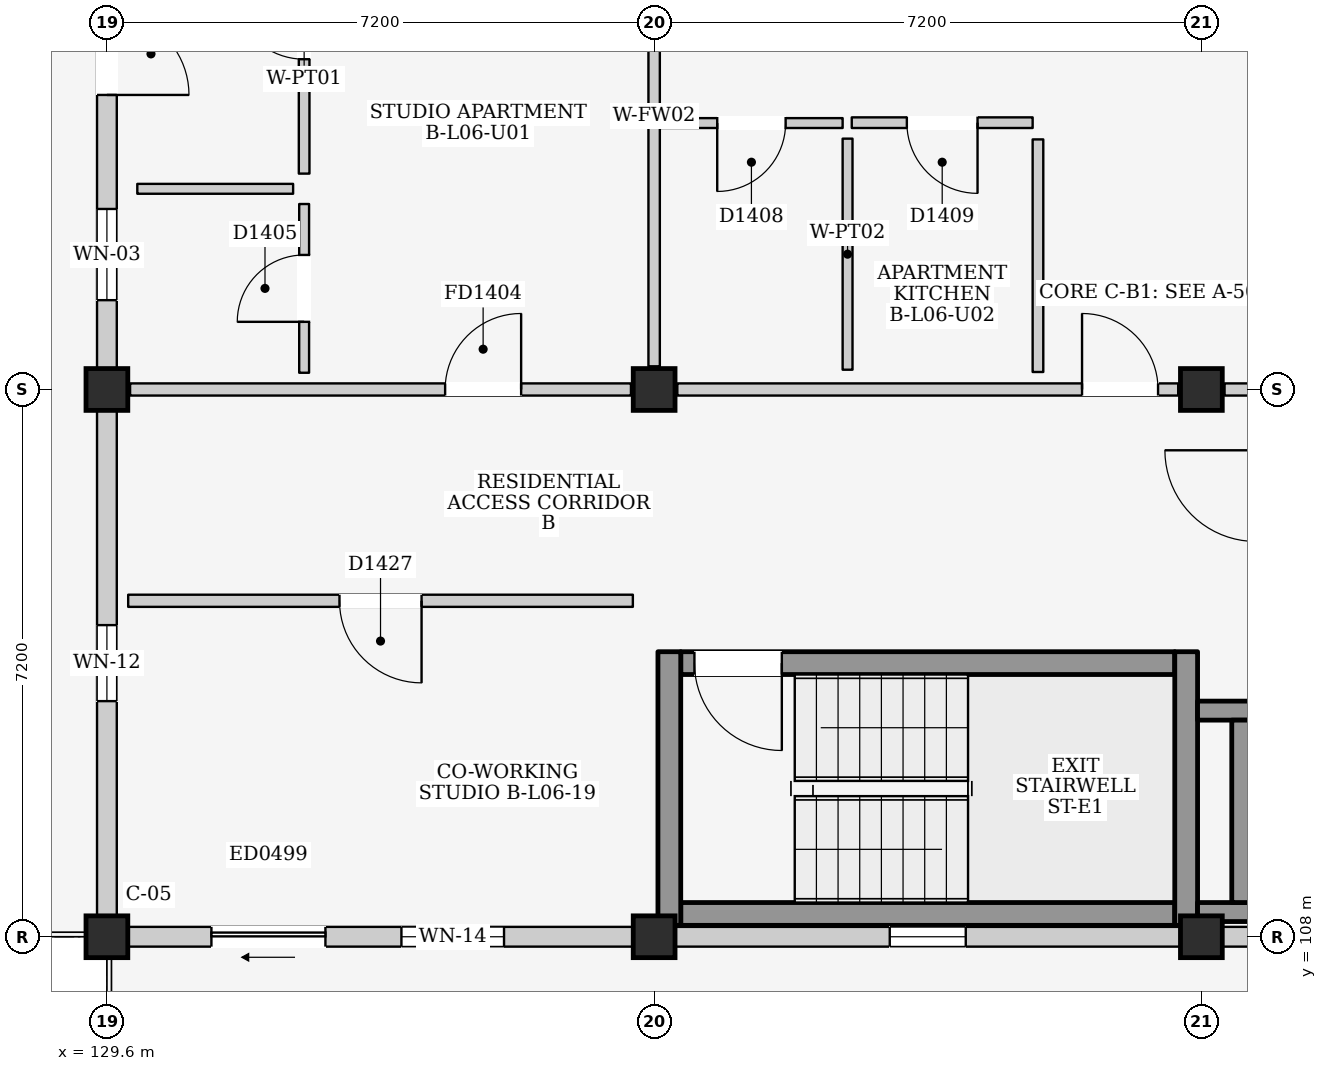
"""IFC4 building model, lengths in metres.
Left out: names, types, materials, properties, quantities, classifications, styles, units other than length and angle.
Written with IfcOpenShell. Run it as: python <this file> out.ifc"""

import sys

from ifc_helpers import new_model, si_unit, direction, frame, frame_2d, origin, origin_2d, place, context, subcontext, project, spatial, rectangle, extrude, element, fill, save


model = new_model("IFC4")
c1 = context("Model", 3, precision=1e-05, world=origin(), true_north=direction((0.0, 1.0)))
c2 = subcontext(c1, "Body", "Model", "MODEL_VIEW")
j1 = project(units=[si_unit("LENGTHUNIT", "METRE"), si_unit("PLANEANGLEUNIT", "RADIAN")], contexts=[c1])
p1 = place(None, origin())
s1 = spatial("IfcSite", under=j1, at=p1, CompositionType="ELEMENT")
p2 = place(p1, origin())
s2 = spatial("IfcBuilding", under=s1, at=p2, CompositionType="ELEMENT")
p3 = place(p2, frame((0.0, 0.0, 21.9)))
s3 = spatial("IfcBuildingStorey", under=s2, at=p3, CompositionType="ELEMENT", Elevation=21.9)
for number, where, z_axis, x_axis in (
    (1, (129.6, 108.0, 0.0), (0.0, 0.0, 1.0), (1.0, 0.0, 0.0)),
    (2, (129.6, 115.2, 0.0), (0.0, 0.0, 1.0), (1.0, 0.0, 0.0)),
    (3, (136.8, 108.0, 0.0), (0.0, 0.0, 1.0), (1.0, 0.0, 0.0)),
    (4, (136.8, 115.2, 0.0), (0.0, 0.0, 1.0), (1.0, 0.0, 0.0)),
    (5, (144.0, 108.0, 0.0), (0.0, 0.0, 1.0), (1.0, 0.0, 0.0)),
    (6, (144.0, 115.2, 0.0), (0.0, 0.0, 1.0), (1.0, 0.0, 0.0)),
):
    element("IfcColumn", number, at=place(p3, frame(where, z_axis=z_axis, x_axis=x_axis)), inside=s3, PredefinedType="COLUMN", context=c2, shape_type="SweptSolid", body=[
        extrude(rectangle(XDim=0.55, YDim=0.55, at=origin_2d()), origin(), (0.0, 0.0, 1.0), 3.2),
    ])
p4 = place(p3, frame((129.875, 108.0, 0.0), z_axis=(0.0, 0.0, 1.0), x_axis=(1.0, 0.0, 0.0)))
e7 = element("IfcWall", 7, at=p4, inside=s3, PredefinedType="ELEMENTEDWALL", context=c2, shape_type="SweptSolid", body=[
    extrude(rectangle(XDim=6.65, YDim=0.26, at=frame_2d((3.325, 0.0))), origin(), (0.0, 0.0, 1.0), 2.365),
])
p5 = place(p4, frame((1.1, 0.0, 0.0)))
e8 = element("IfcOpeningElement", 8, at=p5, cuts=e7, PredefinedType="OPENING", context=c2, shape_type="SweptSolid", body=[
    extrude(rectangle(XDim=1.5, YDim=2.12, at=frame_2d((0.75, 1.06))), frame((0.0, 0.145, 0.0), z_axis=(0.0, -1.0, 0.0), x_axis=(1.0, 0.0, 0.0)), (0.0, 0.0, 1.0), 0.29),
])
p6 = place(p4, frame((3.6, 0.0, 0.755)))
e9 = element("IfcOpeningElement", 9, at=p6, cuts=e7, PredefinedType="OPENING", context=c2, shape_type="SweptSolid", body=[
    extrude(rectangle(XDim=1.35, YDim=1.5, at=frame_2d((0.675, 0.75))), frame((0.0, 0.145, 0.0), z_axis=(0.0, -1.0, 0.0), x_axis=(1.0, 0.0, 0.0)), (0.0, 0.0, 1.0), 0.29),
])
p7 = place(p3, frame((129.6, 108.275, 0.0), z_axis=(0.0, 0.0, 1.0), x_axis=(0.0, 1.0, 0.0)))
e10 = element("IfcWall", 10, at=p7, inside=s3, PredefinedType="ELEMENTEDWALL", context=c2, shape_type="SweptSolid", body=[
    extrude(rectangle(XDim=6.65, YDim=0.26, at=frame_2d((3.325, 0.0))), origin(), (0.0, 0.0, 1.0), 2.465),
])
p8 = place(p7, frame((2.825, 0.0, 1.1)))
e11 = element("IfcOpeningElement", 11, at=p8, cuts=e10, PredefinedType="OPENING", context=c2, shape_type="SweptSolid", body=[
    extrude(rectangle(XDim=1.0, YDim=0.9, at=frame_2d((0.5, 0.45))), frame((0.0, 0.145, 0.0), z_axis=(0.0, -1.0, 0.0), x_axis=(1.0, 0.0, 0.0)), (0.0, 0.0, 1.0), 0.29),
])
p9 = place(p3, frame((129.6, 115.475, 0.0), z_axis=(0.0, 0.0, 1.0), x_axis=(0.0, 1.0, 0.0)))
e12 = element("IfcWall", 12, at=p9, inside=s3, PredefinedType="ELEMENTEDWALL", context=c2, shape_type="SweptSolid", body=[
    extrude(rectangle(XDim=6.65, YDim=0.26, at=frame_2d((3.325, 0.0))), origin(), (0.0, 0.0, 1.0), 2.465),
])
p10 = place(p9, frame((3.6, 0.0, 0.0)))
e13 = element("IfcOpeningElement", 13, at=p10, cuts=e12, PredefinedType="OPENING", context=c2, shape_type="SweptSolid", body=[
    extrude(rectangle(XDim=1.08, YDim=2.12, at=frame_2d((0.54, 1.06))), frame((0.0, 0.145, 0.0), z_axis=(0.0, -1.0, 0.0), x_axis=(1.0, 0.0, 0.0)), (0.0, 0.0, 1.0), 0.29),
])
p11 = place(p9, frame((0.9, 0.0, 0.95)))
e14 = element("IfcOpeningElement", 14, at=p11, cuts=e12, PredefinedType="OPENING", context=c2, shape_type="SweptSolid", body=[
    extrude(rectangle(XDim=1.2, YDim=1.35, at=frame_2d((0.6, 0.675))), frame((0.0, 0.145, 0.0), z_axis=(0.0, -1.0, 0.0), x_axis=(1.0, 0.0, 0.0)), (0.0, 0.0, 1.0), 0.29),
])
p12 = place(p3, frame((137.075, 108.0, 0.0), z_axis=(0.0, 0.0, 1.0), x_axis=(1.0, 0.0, 0.0)))
e15 = element("IfcWall", 15, at=p12, inside=s3, PredefinedType="ELEMENTEDWALL", context=c2, shape_type="SweptSolid", body=[
    extrude(rectangle(XDim=6.65, YDim=0.26, at=frame_2d((3.325, 0.0))), origin(), (0.0, 0.0, 1.0), 2.365),
])
p13 = place(p12, frame((2.825, 0.0, 1.2)))
e16 = element("IfcOpeningElement", 16, at=p13, cuts=e15, PredefinedType="OPENING", context=c2, shape_type="SweptSolid", body=[
    extrude(rectangle(XDim=1.0, YDim=0.9, at=frame_2d((0.5, 0.45))), frame((0.0, 0.145, 0.0), z_axis=(0.0, -1.0, 0.0), x_axis=(1.0, 0.0, 0.0)), (0.0, 0.0, 1.0), 0.29),
])
p14 = place(p3, frame((144.275, 108.0, 0.0), z_axis=(0.0, 0.0, 1.0), x_axis=(1.0, 0.0, 0.0)))
e17 = element("IfcWall", 17, at=p14, inside=s3, PredefinedType="ELEMENTEDWALL", context=c2, shape_type="SweptSolid", body=[
    extrude(rectangle(XDim=6.65, YDim=0.26, at=frame_2d((3.325, 0.0))), origin(), (0.0, 0.0, 1.0), 2.365),
])
p15 = place(p14, frame((2.825, 0.0, 1.2)))
e18 = element("IfcOpeningElement", 18, at=p15, cuts=e17, PredefinedType="OPENING", context=c2, shape_type="SweptSolid", body=[
    extrude(rectangle(XDim=1.0, YDim=0.9, at=frame_2d((0.5, 0.45))), frame((0.0, 0.145, 0.0), z_axis=(0.0, -1.0, 0.0), x_axis=(1.0, 0.0, 0.0)), (0.0, 0.0, 1.0), 0.29),
])
p16 = place(p3, frame((137.15, 108.3, 0.0), z_axis=(0.0, 0.0, 1.0), x_axis=(1.0, 0.0, 0.0)))
e19 = element("IfcWall", 19, at=p16, inside=s3, PredefinedType="SHEAR", context=c2, shape_type="SweptSolid", body=[
    extrude(rectangle(XDim=6.5, YDim=0.3, at=frame_2d((3.25, 0.0))), origin(), (0.0, 0.0, 1.0), 2.98),
])
p17 = place(p3, frame((137.15, 111.6, 0.0), z_axis=(0.0, 0.0, 1.0), x_axis=(1.0, 0.0, 0.0)))
e20 = element("IfcWall", 20, at=p17, inside=s3, PredefinedType="SHEAR", context=c2, shape_type="SweptSolid", body=[
    extrude(rectangle(XDim=6.5, YDim=0.3, at=frame_2d((3.25, 0.0))), origin(), (0.0, 0.0, 1.0), 2.98),
])
p18 = place(p17, frame((0.18, 0.0, 0.0)))
e21 = element("IfcOpeningElement", 21, at=p18, cuts=e20, PredefinedType="OPENING", context=c2, shape_type="SweptSolid", body=[
    extrude(rectangle(XDim=1.15, YDim=2.2, at=frame_2d((0.575, 1.1))), frame((0.0, 0.165, 0.0), z_axis=(0.0, -1.0, 0.0), x_axis=(1.0, 0.0, 0.0)), (0.0, 0.0, 1.0), 0.33),
])
for number, where, z_axis, x_axis in (
    (22, (137.0, 108.15, 0.0), (0.0, 0.0, 1.0), (0.0, 1.0, 0.0)),
    (23, (143.8, 108.15, 0.0), (0.0, 0.0, 1.0), (0.0, 1.0, 0.0)),
):
    element("IfcWall", number, at=place(p3, frame(where, z_axis=z_axis, x_axis=x_axis)), inside=s3, PredefinedType="SHEAR", context=c2, shape_type="SweptSolid", body=[
        extrude(rectangle(XDim=3.6, YDim=0.3, at=frame_2d((1.8, 0.0))), origin(), (0.0, 0.0, 1.0), 2.98),
    ])
p19 = place(p3, frame((143.95, 108.325, 0.0), z_axis=(0.0, 0.0, 1.0), x_axis=(1.0, 0.0, 0.0)))
e24 = element("IfcWall", 24, at=p19, inside=s3, PredefinedType="SHEAR", context=c2, shape_type="SweptSolid", body=[
    extrude(rectangle(XDim=2.675, YDim=0.25, at=frame_2d((1.337, 0.0))), origin(), (0.0, 0.0, 1.0), 2.98),
])
p20 = place(p3, frame((143.95, 110.975, 0.0), z_axis=(0.0, 0.0, 1.0), x_axis=(1.0, 0.0, 0.0)))
e25 = element("IfcWall", 25, at=p20, inside=s3, PredefinedType="SHEAR", context=c2, shape_type="SweptSolid", body=[
    extrude(rectangle(XDim=2.675, YDim=0.25, at=frame_2d((1.337, 0.0))), origin(), (0.0, 0.0, 1.0), 2.98),
])
p21 = place(p20, frame((1.0, 0.0, 0.0)))
e26 = element("IfcOpeningElement", 26, at=p21, cuts=e25, PredefinedType="OPENING", context=c2, shape_type="SweptSolid", body=[
    extrude(rectangle(XDim=1.2, YDim=2.25, at=frame_2d((0.6, 1.125))), frame((0.0, 0.14, 0.0), z_axis=(0.0, -1.0, 0.0), x_axis=(1.0, 0.0, 0.0)), (0.0, 0.0, 1.0), 0.28),
])
p22 = place(p3, frame((144.525, 108.45, 0.0), z_axis=(0.0, 0.0, 1.0), x_axis=(0.0, 1.0, 0.0)))
e27 = element("IfcWall", 27, at=p22, inside=s3, PredefinedType="SHEAR", context=c2, shape_type="SweptSolid", body=[
    extrude(rectangle(XDim=2.4, YDim=0.25, at=frame_2d((1.2, 0.0))), origin(), (0.0, 0.0, 1.0), 2.98),
])
p23 = place(p3, frame((129.905, 115.2, 0.0), z_axis=(0.0, 0.0, 1.0), x_axis=(1.0, 0.0, 0.0)))
e28 = element("IfcWall", 28, at=p23, inside=s3, PredefinedType="PARTITIONING", context=c2, shape_type="SweptSolid", body=[
    extrude(rectangle(XDim=6.59, YDim=0.16, at=frame_2d((3.295, 0.0))), origin(), (0.0, 0.0, 1.0), 2.365),
])
p24 = place(p23, frame((4.145, 0.0, 0.0)))
e29 = element("IfcOpeningElement", 29, at=p24, cuts=e28, PredefinedType="OPENING", context=c2, shape_type="SweptSolid", body=[
    extrude(rectangle(XDim=1.0, YDim=2.15, at=frame_2d((0.5, 1.075))), frame((0.0, 0.095, 0.0), z_axis=(0.0, -1.0, 0.0), x_axis=(1.0, 0.0, 0.0)), (0.0, 0.0, 1.0), 0.19),
])
p25 = place(p3, frame((136.8, 115.505, 0.0), z_axis=(0.0, 0.0, 1.0), x_axis=(0.0, 1.0, 0.0)))
e30 = element("IfcWall", 30, at=p25, inside=s3, PredefinedType="PARTITIONING", context=c2, shape_type="SweptSolid", body=[
    extrude(rectangle(XDim=6.59, YDim=0.15, at=frame_2d((3.295, 0.0))), origin(), (0.0, 0.0, 1.0), 2.465),
])
p26 = place(p3, frame((130.0, 117.84, 0.0), z_axis=(0.0, 0.0, 1.0), x_axis=(1.0, 0.0, 0.0)))
e31 = element("IfcWall", 31, at=p26, inside=s3, PredefinedType="PARTITIONING", context=c2, shape_type="SweptSolid", body=[
    extrude(rectangle(XDim=2.05, YDim=0.13, at=frame_2d((1.025, 0.0))), origin(), (0.0, 0.0, 1.0), 2.98),
])
p27 = place(p3, frame((132.195, 115.42, 0.0), z_axis=(0.0, 0.0, 1.0), x_axis=(0.0, 1.0, 0.0)))
e32 = element("IfcWall", 32, at=p27, inside=s3, PredefinedType="PARTITIONING", context=c2, shape_type="SweptSolid", body=[
    extrude(rectangle(XDim=2.22, YDim=0.13, at=frame_2d((1.11, 0.0))), origin(), (0.0, 0.0, 1.0), 2.98),
])
p28 = place(p27, frame((0.67, 0.0, 0.0)))
e33 = element("IfcOpeningElement", 33, at=p28, cuts=e32, PredefinedType="OPENING", context=c2, shape_type="SweptSolid", body=[
    extrude(rectangle(XDim=0.88, YDim=2.1, at=frame_2d((0.44, 1.05))), frame((0.0, 0.08, 0.0), z_axis=(0.0, -1.0, 0.0), x_axis=(1.0, 0.0, 0.0)), (0.0, 0.0, 1.0), 0.16),
])
p29 = place(p3, frame((132.195, 118.04, 0.0), z_axis=(0.0, 0.0, 1.0), x_axis=(0.0, 1.0, 0.0)))
e34 = element("IfcWall", 34, at=p29, inside=s3, PredefinedType="PARTITIONING", context=c2, shape_type="SweptSolid", body=[
    extrude(rectangle(XDim=3.94, YDim=0.14, at=frame_2d((1.97, 0.0))), origin(), (0.0, 0.0, 1.0), 2.98),
])
p30 = place(p29, frame((1.505, 0.0, 0.0)))
e35 = element("IfcOpeningElement", 35, at=p30, cuts=e34, PredefinedType="OPENING", context=c2, shape_type="SweptSolid", body=[
    extrude(rectangle(XDim=0.93, YDim=2.14, at=frame_2d((0.465, 1.07))), frame((0.0, 0.085, 0.0), z_axis=(0.0, -1.0, 0.0), x_axis=(1.0, 0.0, 0.0)), (0.0, 0.0, 1.0), 0.17),
])
p31 = place(p3, frame((137.105, 115.2, 0.0), z_axis=(0.0, 0.0, 1.0), x_axis=(1.0, 0.0, 0.0)))
e36 = element("IfcWall", 36, at=p31, inside=s3, PredefinedType="PARTITIONING", context=c2, shape_type="SweptSolid", body=[
    extrude(rectangle(XDim=6.59, YDim=0.16, at=frame_2d((3.295, 0.0))), origin(), (0.0, 0.0, 1.0), 2.365),
])
p32 = place(p31, frame((5.325, 0.0, 0.0)))
e37 = element("IfcOpeningElement", 37, at=p32, cuts=e36, PredefinedType="OPENING", context=c2, shape_type="SweptSolid", body=[
    extrude(rectangle(XDim=1.0, YDim=2.15, at=frame_2d((0.5, 1.075))), frame((0.0, 0.095, 0.0), z_axis=(0.0, -1.0, 0.0), x_axis=(1.0, 0.0, 0.0)), (0.0, 0.0, 1.0), 0.19),
])
p33 = place(p3, frame((144.305, 115.2, 0.0), z_axis=(0.0, 0.0, 1.0), x_axis=(1.0, 0.0, 0.0)))
e38 = element("IfcWall", 38, at=p33, inside=s3, PredefinedType="PARTITIONING", context=c2, shape_type="SweptSolid", body=[
    extrude(rectangle(XDim=6.59, YDim=0.16, at=frame_2d((3.295, 0.0))), origin(), (0.0, 0.0, 1.0), 2.365),
])
p34 = place(p3, frame((136.88, 118.705, 0.0), z_axis=(0.0, 0.0, 1.0), x_axis=(1.0, 0.0, 0.0)))
e39 = element("IfcWall", 39, at=p34, inside=s3, PredefinedType="PARTITIONING", context=c2, shape_type="SweptSolid", body=[
    extrude(rectangle(XDim=2.4, YDim=0.13, at=frame_2d((1.2, 0.0))), origin(), (0.0, 0.0, 1.0), 2.98),
])
p35 = place(p34, frame((0.75, 0.0, 0.0)))
e40 = element("IfcOpeningElement", 40, at=p35, cuts=e39, PredefinedType="OPENING", context=c2, shape_type="SweptSolid", body=[
    extrude(rectangle(XDim=0.9, YDim=2.1, at=frame_2d((0.45, 1.05))), frame((0.0, 0.08, 0.0), z_axis=(0.0, -1.0, 0.0), x_axis=(1.0, 0.0, 0.0)), (0.0, 0.0, 1.0), 0.16),
])
p36 = place(p3, frame((139.345, 115.46, 0.0), z_axis=(0.0, 0.0, 1.0), x_axis=(0.0, 1.0, 0.0)))
e41 = element("IfcWall", 41, at=p36, inside=s3, PredefinedType="PARTITIONING", context=c2, shape_type="SweptSolid", body=[
    extrude(rectangle(XDim=3.04, YDim=0.13, at=frame_2d((1.52, 0.0))), origin(), (0.0, 0.0, 1.0), 2.98),
])
p37 = place(p3, frame((139.4, 118.71, 0.0), z_axis=(0.0, 0.0, 1.0), x_axis=(1.0, 0.0, 0.0)))
e42 = element("IfcWall", 42, at=p37, inside=s3, PredefinedType="PARTITIONING", context=c2, shape_type="SweptSolid", body=[
    extrude(rectangle(XDim=2.38, YDim=0.14, at=frame_2d((1.19, 0.0))), origin(), (0.0, 0.0, 1.0), 2.98),
])
p38 = place(p37, frame((0.725, 0.0, 0.0)))
e43 = element("IfcOpeningElement", 43, at=p38, cuts=e42, PredefinedType="OPENING", context=c2, shape_type="SweptSolid", body=[
    extrude(rectangle(XDim=0.93, YDim=2.14, at=frame_2d((0.465, 1.07))), frame((0.0, 0.085, 0.0), z_axis=(0.0, -1.0, 0.0), x_axis=(1.0, 0.0, 0.0)), (0.0, 0.0, 1.0), 0.17),
])
p39 = place(p3, frame((141.85, 115.43, 0.0), z_axis=(0.0, 0.0, 1.0), x_axis=(0.0, 1.0, 0.0)))
e44 = element("IfcWall", 44, at=p39, inside=s3, PredefinedType="PARTITIONING", context=c2, shape_type="SweptSolid", body=[
    extrude(rectangle(XDim=3.06, YDim=0.14, at=frame_2d((1.53, 0.0))), origin(), (0.0, 0.0, 1.0), 2.98),
])
p40 = place(p3, frame((129.88, 112.42, 0.0), z_axis=(0.0, 0.0, 1.0), x_axis=(1.0, 0.0, 0.0)))
e45 = element("IfcWall", 45, at=p40, inside=s3, PredefinedType="PARTITIONING", context=c2, shape_type="SweptSolid", body=[
    extrude(rectangle(XDim=6.64, YDim=0.16, at=frame_2d((3.32, 0.0))), origin(), (0.0, 0.0, 1.0), 2.98),
])
p41 = place(p40, frame((2.78, 0.0, 0.0)))
e46 = element("IfcOpeningElement", 46, at=p41, cuts=e45, PredefinedType="OPENING", context=c2, shape_type="SweptSolid", body=[
    extrude(rectangle(XDim=1.08, YDim=2.22, at=frame_2d((0.54, 1.11))), frame((0.0, 0.095, 0.0), z_axis=(0.0, -1.0, 0.0), x_axis=(1.0, 0.0, 0.0)), (0.0, 0.0, 1.0), 0.19),
])
p42 = place(p5, frame((1.5, 0.0, 0.0), z_axis=(0.0, 0.0, 1.0), x_axis=(-1.0, 0.0, 0.0)))
e47 = element("IfcDoor", 47, at=p42, inside=s3, OperationType="SLIDING_TO_LEFT", PredefinedType="DOOR", context=c2, shape_type="SweptSolid", body=[
    extrude(rectangle(XDim=1.5, YDim=2.12, at=frame_2d((0.75, 1.06))), frame((0.0, 0.025, 0.0), z_axis=(0.0, -1.0, 0.0), x_axis=(1.0, 0.0, 0.0)), (0.0, 0.0, 1.0), 0.05),
])
fill(e8, e47)
p43 = place(p6, origin())
e48 = element("IfcWindow", 48, at=p43, inside=s3, PartitioningType="SINGLE_PANEL", PredefinedType="WINDOW", context=c2, shape_type="SweptSolid", body=[
    extrude(rectangle(XDim=1.35, YDim=1.5, at=frame_2d((0.675, 0.75))), frame((0.0, 0.03, 0.0), z_axis=(0.0, -1.0, 0.0), x_axis=(1.0, 0.0, 0.0)), (0.0, 0.0, 1.0), 0.06),
])
fill(e9, e48)
p44 = place(p8, origin())
e49 = element("IfcWindow", 49, at=p44, inside=s3, PartitioningType="SINGLE_PANEL", PredefinedType="WINDOW", context=c2, shape_type="SweptSolid", body=[
    extrude(rectangle(XDim=1.0, YDim=0.9, at=frame_2d((0.5, 0.45))), frame((0.0, 0.03, 0.0), z_axis=(0.0, -1.0, 0.0), x_axis=(1.0, 0.0, 0.0)), (0.0, 0.0, 1.0), 0.06),
])
fill(e11, e49)
p45 = place(p10, frame((1.08, 0.0, 0.0), z_axis=(0.0, 0.0, 1.0), x_axis=(-1.0, 0.0, 0.0)))
e50 = element("IfcDoor", 50, at=p45, inside=s3, OperationType="SINGLE_SWING_RIGHT", PredefinedType="DOOR", context=c2, shape_type="SweptSolid", body=[
    extrude(rectangle(XDim=1.08, YDim=2.12, at=frame_2d((0.54, 1.06))), frame((0.0, 0.025, 0.0), z_axis=(0.0, -1.0, 0.0), x_axis=(1.0, 0.0, 0.0)), (0.0, 0.0, 1.0), 0.05),
])
fill(e13, e50)
p46 = place(p11, origin())
e51 = element("IfcWindow", 51, at=p46, inside=s3, PartitioningType="SINGLE_PANEL", PredefinedType="WINDOW", context=c2, shape_type="SweptSolid", body=[
    extrude(rectangle(XDim=1.2, YDim=1.35, at=frame_2d((0.6, 0.675))), frame((0.0, 0.03, 0.0), z_axis=(0.0, -1.0, 0.0), x_axis=(1.0, 0.0, 0.0)), (0.0, 0.0, 1.0), 0.06),
])
fill(e14, e51)
p47 = place(p13, origin())
e52 = element("IfcWindow", 52, at=p47, inside=s3, PartitioningType="SINGLE_PANEL", PredefinedType="WINDOW", context=c2, shape_type="SweptSolid", body=[
    extrude(rectangle(XDim=1.0, YDim=0.9, at=frame_2d((0.5, 0.45))), frame((0.0, 0.03, 0.0), z_axis=(0.0, -1.0, 0.0), x_axis=(1.0, 0.0, 0.0)), (0.0, 0.0, 1.0), 0.06),
])
fill(e16, e52)
p48 = place(p18, frame((1.15, 0.0, 0.0), z_axis=(0.0, 0.0, 1.0), x_axis=(-1.0, 0.0, 0.0)))
e53 = element("IfcDoor", 53, at=p48, inside=s3, OperationType="SINGLE_SWING_LEFT", PredefinedType="DOOR", context=c2, shape_type="SweptSolid", body=[
    extrude(rectangle(XDim=1.15, YDim=2.2, at=frame_2d((0.575, 1.1))), frame((0.0, 0.025, 0.0), z_axis=(0.0, -1.0, 0.0), x_axis=(1.0, 0.0, 0.0)), (0.0, 0.0, 1.0), 0.05),
])
fill(e21, e53)
p49 = place(p24, origin())
e54 = element("IfcDoor", 54, at=p49, inside=s3, OperationType="SINGLE_SWING_RIGHT", PredefinedType="DOOR", context=c2, shape_type="SweptSolid", body=[
    extrude(rectangle(XDim=1.0, YDim=2.15, at=frame_2d((0.5, 1.075))), frame((0.0, 0.025, 0.0), z_axis=(0.0, -1.0, 0.0), x_axis=(1.0, 0.0, 0.0)), (0.0, 0.0, 1.0), 0.05),
])
fill(e29, e54)
p50 = place(p28, origin())
e55 = element("IfcDoor", 55, at=p50, inside=s3, OperationType="SINGLE_SWING_LEFT", PredefinedType="DOOR", context=c2, shape_type="SweptSolid", body=[
    extrude(rectangle(XDim=0.88, YDim=2.1, at=frame_2d((0.44, 1.05))), frame((0.0, 0.025, 0.0), z_axis=(0.0, -1.0, 0.0), x_axis=(1.0, 0.0, 0.0)), (0.0, 0.0, 1.0), 0.05),
])
fill(e33, e55)
p51 = place(p30, origin())
e56 = element("IfcDoor", 56, at=p51, inside=s3, OperationType="SINGLE_SWING_RIGHT", PredefinedType="DOOR", context=c2, shape_type="SweptSolid", body=[
    extrude(rectangle(XDim=0.93, YDim=2.14, at=frame_2d((0.465, 1.07))), frame((0.0, 0.025, 0.0), z_axis=(0.0, -1.0, 0.0), x_axis=(1.0, 0.0, 0.0)), (0.0, 0.0, 1.0), 0.05),
])
fill(e35, e56)
p52 = place(p32, origin())
e57 = element("IfcDoor", 57, at=p52, inside=s3, OperationType="SINGLE_SWING_LEFT", PredefinedType="DOOR", context=c2, shape_type="SweptSolid", body=[
    extrude(rectangle(XDim=1.0, YDim=2.15, at=frame_2d((0.5, 1.075))), frame((0.0, 0.025, 0.0), z_axis=(0.0, -1.0, 0.0), x_axis=(1.0, 0.0, 0.0)), (0.0, 0.0, 1.0), 0.05),
])
fill(e37, e57)
p53 = place(p35, frame((0.9, 0.0, 0.0), z_axis=(0.0, 0.0, 1.0), x_axis=(-1.0, 0.0, 0.0)))
e58 = element("IfcDoor", 58, at=p53, inside=s3, OperationType="SINGLE_SWING_RIGHT", PredefinedType="DOOR", context=c2, shape_type="SweptSolid", body=[
    extrude(rectangle(XDim=0.9, YDim=2.1, at=frame_2d((0.45, 1.05))), frame((0.0, 0.025, 0.0), z_axis=(0.0, -1.0, 0.0), x_axis=(1.0, 0.0, 0.0)), (0.0, 0.0, 1.0), 0.05),
])
fill(e40, e58)
p54 = place(p38, frame((0.93, 0.0, 0.0), z_axis=(0.0, 0.0, 1.0), x_axis=(-1.0, 0.0, 0.0)))
e59 = element("IfcDoor", 59, at=p54, inside=s3, OperationType="SINGLE_SWING_LEFT", PredefinedType="DOOR", context=c2, shape_type="SweptSolid", body=[
    extrude(rectangle(XDim=0.93, YDim=2.14, at=frame_2d((0.465, 1.07))), frame((0.0, 0.025, 0.0), z_axis=(0.0, -1.0, 0.0), x_axis=(1.0, 0.0, 0.0)), (0.0, 0.0, 1.0), 0.05),
])
fill(e43, e59)
p55 = place(p41, frame((1.08, 0.0, 0.0), z_axis=(0.0, 0.0, 1.0), x_axis=(-1.0, 0.0, 0.0)))
e60 = element("IfcDoor", 60, at=p55, inside=s3, OperationType="SINGLE_SWING_LEFT", PredefinedType="DOOR", context=c2, shape_type="SweptSolid", body=[
    extrude(rectangle(XDim=1.08, YDim=2.22, at=frame_2d((0.54, 1.11))), frame((0.0, 0.025, 0.0), z_axis=(0.0, -1.0, 0.0), x_axis=(1.0, 0.0, 0.0)), (0.0, 0.0, 1.0), 0.05),
])
fill(e46, e60)
save(model, sys.argv[1])
